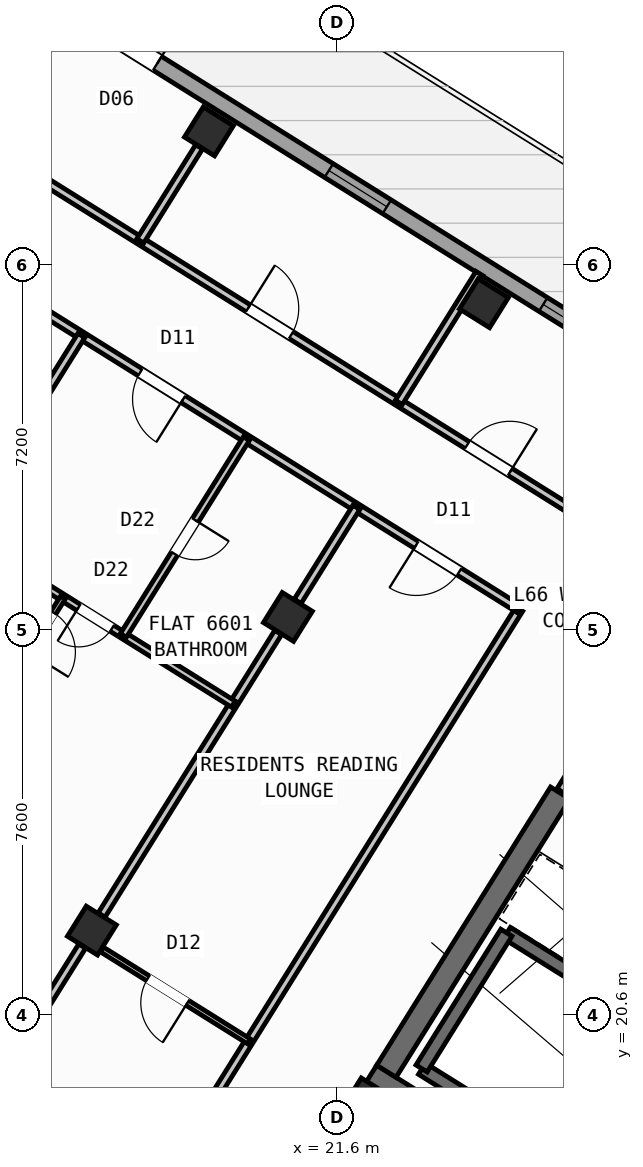
"""IFC4 building model, lengths in metres.
Left out: names, types, materials, properties, quantities, classifications, styles, units other than length and angle.
Written with IfcOpenShell. Run it as: python <this file> out.ifc"""

import sys

from ifc_helpers import new_model, si_unit, direction, frame, frame_2d, origin, origin_2d, place, context, subcontext, project, spatial, rectangle, hollow_rectangle, extrude, source, transform, mapped, element, fill, save


model = new_model("IFC4")
c1 = context("Model", 3, precision=1e-05, world=origin(), true_north=direction((0.0, 1.0)))
c2 = subcontext(c1, "Body", "Model", "MODEL_VIEW")
j1 = project(units=[si_unit("LENGTHUNIT", "METRE"), si_unit("PLANEANGLEUNIT", "RADIAN")], contexts=[c1])
p1 = place(None, origin())
s1 = spatial("IfcSite", under=j1, at=p1, CompositionType="ELEMENT")
p2 = place(p1, origin())
s2 = spatial("IfcBuilding", under=s1, at=p2, CompositionType="ELEMENT")
p3 = place(p2, frame((0.0, 0.0, 262.8)))
s3 = spatial("IfcBuildingStorey", under=s2, at=p3, CompositionType="ELEMENT", Elevation=262.8)
p4 = place(p3, frame((33.324, 12.503, 0.0), z_axis=(0.0, 0.0, 1.0), x_axis=(-0.848043529849, 0.529926571782, 0.0)))
e1 = element("IfcWall", 1, at=p4, inside=s3, PredefinedType="SHEAR", context=c2, shape_type="SweptSolid", body=[
    extrude(rectangle(XDim=13.04, YDim=0.45, at=frame_2d((6.52, 0.0))), origin(), (0.0, 0.0, 1.0), 3.35),
])
p5 = place(p3, frame((26.007, 24.976, 0.0), z_axis=(0.0, 0.0, 1.0), x_axis=(-0.529931155655, -0.848040665456, 0.0)))
e2 = element("IfcWall", 2, at=p5, inside=s3, PredefinedType="SHEAR", context=c2, shape_type="SweptSolid", body=[
    extrude(rectangle(XDim=6.475, YDim=0.45, at=frame_2d((3.238, 0.0))), origin(), (0.0, 0.0, 1.0), 3.35),
])
m1 = source(origin(), c2, "Body", "SweptSolid", [
    extrude(hollow_rectangle(XDim=0.7, YDim=0.7, WallThickness=0.028, at=origin_2d()), origin(), (0.0, 0.0, 1.0), 3.6),
])
for number, where, z_axis, x_axis in (
    (3, (22.191, 18.87, 0.0), (0.0, 0.0, 1.0), (-0.848, 0.53, 0.0)),
    (4, (24.5, 34.643, 0.0), (0.0, 0.0, 1.0), (-0.848, 0.53, 0.0)),
    (5, (20.632, 28.452, 0.0), (0.0, 0.0, 1.0), (-0.848, 0.53, 0.0)),
    (6, (16.764, 22.261, 0.0), (0.0, 0.0, 1.0), (-0.848, 0.53, 0.0)),
    (7, (19.073, 38.034, 0.0), (0.0, 0.0, 1.0), (-0.848, 0.53, 0.0)),
):
    element("IfcColumn", number, at=place(p3, frame(where, z_axis=z_axis, x_axis=x_axis)), inside=s3, PredefinedType="COLUMN", context=c2, shape_type="MappedRepresentation", body=[
        mapped(m1, transform((0.0, 0.0, 0.0), scale=1.0)),
    ])
p6 = place(p3, frame((29.268, 6.429, 0.0), z_axis=(0.0, 0.0, 1.0), x_axis=(-0.848049971435, 0.529916263149, 0.0)))
e8 = element("IfcWall", 8, at=p6, inside=s3, PredefinedType="STANDARD", context=c2, shape_type="SweptSolid", body=[
    extrude(rectangle(XDim=31.588, YDim=0.32, at=frame_2d((15.794, 0.0))), origin(), (0.0, 0.0, 1.0), 3.35),
])
p7 = place(p6, frame((16.362, 0.0, 0.0)))
e9 = element("IfcOpeningElement", 9, at=p7, cuts=e8, PredefinedType="OPENING", context=c2, shape_type="SweptSolid", body=[
    extrude(rectangle(XDim=1.2, YDim=2.15, at=frame_2d((0.6, 1.075))), frame((0.0, 0.17, 0.0), z_axis=(0.0, -1.0, 0.0), x_axis=(1.0, 0.0, 0.0)), (0.0, 0.0, 1.0), 0.34),
])
p8 = place(p6, frame((3.859, 0.0, 0.9)))
e10 = element("IfcOpeningElement", 10, at=p8, cuts=e8, PredefinedType="OPENING", context=c2, shape_type="SweptSolid", body=[
    extrude(rectangle(XDim=1.65, YDim=1.45, at=frame_2d((0.825, 0.725))), frame((0.0, 0.17, 0.0), z_axis=(0.0, -1.0, 0.0), x_axis=(1.0, 0.0, 0.0)), (0.0, 0.0, 1.0), 0.34),
])
p9 = place(p6, frame((10.519, 0.0, 0.9)))
e11 = element("IfcOpeningElement", 11, at=p9, cuts=e8, PredefinedType="OPENING", context=c2, shape_type="SweptSolid", body=[
    extrude(rectangle(XDim=1.65, YDim=1.45, at=frame_2d((0.825, 0.725))), frame((0.0, 0.17, 0.0), z_axis=(0.0, -1.0, 0.0), x_axis=(1.0, 0.0, 0.0)), (0.0, 0.0, 1.0), 0.34),
])
p10 = place(p6, frame((20.015, 0.0, 0.95)))
e12 = element("IfcOpeningElement", 12, at=p10, cuts=e8, PredefinedType="OPENING", context=c2, shape_type="SweptSolid", body=[
    extrude(rectangle(XDim=1.95, YDim=1.35, at=frame_2d((0.975, 0.675))), frame((0.0, 0.17, 0.0), z_axis=(0.0, -1.0, 0.0), x_axis=(1.0, 0.0, 0.0)), (0.0, 0.0, 1.0), 0.34),
])
p11 = place(p6, frame((23.715, 0.0, 1.0)))
e13 = element("IfcOpeningElement", 13, at=p11, cuts=e8, PredefinedType="OPENING", context=c2, shape_type="SweptSolid", body=[
    extrude(rectangle(XDim=0.9, YDim=1.25, at=frame_2d((0.45, 0.625))), frame((0.0, 0.17, 0.0), z_axis=(0.0, -1.0, 0.0), x_axis=(1.0, 0.0, 0.0)), (0.0, 0.0, 1.0), 0.34),
])
p12 = place(p6, frame((26.391, 0.0, 0.9)))
e14 = element("IfcOpeningElement", 14, at=p12, cuts=e8, PredefinedType="OPENING", context=c2, shape_type="SweptSolid", body=[
    extrude(rectangle(XDim=1.65, YDim=1.45, at=frame_2d((0.825, 0.725))), frame((0.0, 0.17, 0.0), z_axis=(0.0, -1.0, 0.0), x_axis=(1.0, 0.0, 0.0)), (0.0, 0.0, 1.0), 0.34),
])
p13 = place(p6, frame((29.878, 0.0, 1.0)))
e15 = element("IfcOpeningElement", 15, at=p13, cuts=e8, PredefinedType="OPENING", context=c2, shape_type="SweptSolid", body=[
    extrude(rectangle(XDim=0.9, YDim=1.25, at=frame_2d((0.45, 0.625))), frame((0.0, 0.17, 0.0), z_axis=(0.0, -1.0, 0.0), x_axis=(1.0, 0.0, 0.0)), (0.0, 0.0, 1.0), 0.34),
])
p14 = place(p3, frame((14.138, 41.825, 0.0), z_axis=(0.0, 0.0, 1.0), x_axis=(0.848046498049, -0.529921821731, 0.0)))
e16 = element("IfcWall", 16, at=p14, inside=s3, PredefinedType="STANDARD", context=c2, shape_type="SweptSolid", body=[
    extrude(rectangle(XDim=31.588, YDim=0.32, at=frame_2d((15.794, 0.0))), origin(), (0.0, 0.0, 1.0), 3.35),
])
p15 = place(p14, frame((3.568, 0.0, 0.0)))
e17 = element("IfcOpeningElement", 17, at=p15, cuts=e16, PredefinedType="OPENING", context=c2, shape_type="SweptSolid", body=[
    extrude(rectangle(XDim=1.05, YDim=2.15, at=frame_2d((0.525, 1.075))), frame((0.0, 0.17, 0.0), z_axis=(0.0, -1.0, 0.0), x_axis=(1.0, 0.0, 0.0)), (0.0, 0.0, 1.0), 0.34),
])
p16 = place(p14, frame((1.046, 0.0, 0.9)))
e18 = element("IfcOpeningElement", 18, at=p16, cuts=e16, PredefinedType="OPENING", context=c2, shape_type="SweptSolid", body=[
    extrude(rectangle(XDim=1.65, YDim=1.45, at=frame_2d((0.825, 0.725))), frame((0.0, 0.17, 0.0), z_axis=(0.0, -1.0, 0.0), x_axis=(1.0, 0.0, 0.0)), (0.0, 0.0, 1.0), 0.34),
])
p17 = place(p14, frame((8.61, 0.0, 0.9)))
e19 = element("IfcOpeningElement", 19, at=p17, cuts=e16, PredefinedType="OPENING", context=c2, shape_type="SweptSolid", body=[
    extrude(rectangle(XDim=1.35, YDim=1.45, at=frame_2d((0.675, 0.725))), frame((0.0, 0.17, 0.0), z_axis=(0.0, -1.0, 0.0), x_axis=(1.0, 0.0, 0.0)), (0.0, 0.0, 1.0), 0.34),
])
p18 = place(p14, frame((13.599, 0.0, 0.95)))
e20 = element("IfcOpeningElement", 20, at=p18, cuts=e16, PredefinedType="OPENING", context=c2, shape_type="SweptSolid", body=[
    extrude(rectangle(XDim=1.95, YDim=1.35, at=frame_2d((0.975, 0.675))), frame((0.0, 0.17, 0.0), z_axis=(0.0, -1.0, 0.0), x_axis=(1.0, 0.0, 0.0)), (0.0, 0.0, 1.0), 0.34),
])
p19 = place(p14, frame((17.154, 0.0, 1.0)))
e21 = element("IfcOpeningElement", 21, at=p19, cuts=e16, PredefinedType="OPENING", context=c2, shape_type="SweptSolid", body=[
    extrude(rectangle(XDim=0.9, YDim=1.25, at=frame_2d((0.45, 0.625))), frame((0.0, 0.17, 0.0), z_axis=(0.0, -1.0, 0.0), x_axis=(1.0, 0.0, 0.0)), (0.0, 0.0, 1.0), 0.34),
])
p20 = place(p14, frame((21.719, 0.0, 0.9)))
e22 = element("IfcOpeningElement", 22, at=p20, cuts=e16, PredefinedType="OPENING", context=c2, shape_type="SweptSolid", body=[
    extrude(rectangle(XDim=1.65, YDim=1.45, at=frame_2d((0.825, 0.725))), frame((0.0, 0.17, 0.0), z_axis=(0.0, -1.0, 0.0), x_axis=(1.0, 0.0, 0.0)), (0.0, 0.0, 1.0), 0.34),
])
p21 = place(p14, frame((27.419, 0.0, 0.9)))
e23 = element("IfcOpeningElement", 23, at=p21, cuts=e16, PredefinedType="OPENING", context=c2, shape_type="SweptSolid", body=[
    extrude(rectangle(XDim=1.65, YDim=1.45, at=frame_2d((0.825, 0.725))), frame((0.0, 0.17, 0.0), z_axis=(0.0, -1.0, 0.0), x_axis=(1.0, 0.0, 0.0)), (0.0, 0.0, 1.0), 0.34),
])
p22 = place(p3, frame((29.605, 15.581, 0.0), z_axis=(0.0, 0.0, 1.0), x_axis=(-0.848036911448, 0.529937163087, 0.0)))
e24 = element("IfcWall", 24, at=p22, inside=s3, PredefinedType="SHEAR", context=c2, shape_type="SweptSolid", body=[
    extrude(rectangle(XDim=7.46, YDim=0.26, at=frame_2d((3.73, 0.0))), origin(), (0.0, 0.0, 1.0), 3.35),
])
p23 = place(p3, frame((31.28, 18.261, 0.0), z_axis=(0.0, 0.0, 1.0), x_axis=(-0.848051618787, 0.529913626805, 0.0)))
e25 = element("IfcWall", 25, at=p23, inside=s3, PredefinedType="SHEAR", context=c2, shape_type="SweptSolid", body=[
    extrude(rectangle(XDim=7.46, YDim=0.26, at=frame_2d((3.73, 0.0))), origin(), (0.0, 0.0, 1.0), 3.35),
])
p24 = place(p23, frame((0.36, 0.0, 0.0)))
e26 = element("IfcOpeningElement", 26, at=p24, cuts=e25, PredefinedType="OPENING", context=c2, shape_type="SweptSolid", body=[
    extrude(rectangle(XDim=0.86, YDim=2.05, at=frame_2d((0.43, 1.025))), frame((0.0, 0.14, 0.0), z_axis=(0.0, -1.0, 0.0), x_axis=(1.0, 0.0, 0.0)), (0.0, 0.0, 1.0), 0.28),
])
p25 = place(p3, frame((24.945, 22.22, 0.0), z_axis=(0.0, 0.0, 1.0), x_axis=(-0.529908658664, -0.84805472316, 0.0)))
e27 = element("IfcWall", 27, at=p25, inside=s3, PredefinedType="SHEAR", context=c2, shape_type="SweptSolid", body=[
    extrude(rectangle(XDim=3.16, YDim=0.26, at=frame_2d((1.58, 0.0))), origin(), (0.0, 0.0, 1.0), 3.35),
])
p26 = place(p3, frame((27.596, 27.52, 0.0), z_axis=(0.0, 0.0, 1.0), x_axis=(-0.529865479138, -0.848081702443, 0.0)))
e28 = element("IfcWall", 28, at=p26, inside=s3, PredefinedType="STANDARD", context=c2, shape_type="SweptSolid", body=[
    extrude(rectangle(XDim=2.96, YDim=0.2, at=frame_2d((1.48, 0.0))), origin(), (0.0, 0.0, 1.0), 3.34),
])
p27 = place(p26, frame((0.7, 0.0, 0.0)))
e29 = element("IfcOpeningElement", 29, at=p27, cuts=e28, PredefinedType="OPENING", context=c2, shape_type="SweptSolid", body=[
    extrude(rectangle(XDim=1.5, YDim=2.15, at=frame_2d((0.75, 1.075))), frame((0.0, 0.11, 0.0), z_axis=(0.0, -1.0, 0.0), x_axis=(1.0, 0.0, 0.0)), (0.0, 0.0, 1.0), 0.22),
])
p28 = place(p3, frame((25.198, 28.606, 0.0), z_axis=(0.0, 0.0, 1.0), x_axis=(-0.529921796515, -0.848046513806, 0.0)))
e30 = element("IfcWall", 30, at=p28, inside=s3, PredefinedType="PARTITIONING", context=c2, shape_type="SweptSolid", body=[
    extrude(rectangle(XDim=16.5, YDim=0.16, at=frame_2d((8.25, 0.0))), origin(), (0.0, 0.0, 1.0), 3.34),
])
p29 = place(p3, frame((26.363, 30.472, 0.0), z_axis=(0.0, 0.0, 1.0), x_axis=(-0.848052408131, 0.529912363569, 0.0)))
e31 = element("IfcWall", 31, at=p29, inside=s3, PredefinedType="PARTITIONING", context=c2, shape_type="SweptSolid", body=[
    extrude(rectangle(XDim=16.73, YDim=0.16, at=frame_2d((8.365, 0.0))), origin(), (0.0, 0.0, 1.0), 3.34),
])
p30 = place(p29, frame((1.588, 0.0, 0.0)))
e32 = element("IfcOpeningElement", 32, at=p30, cuts=e31, PredefinedType="OPENING", context=c2, shape_type="SweptSolid", body=[
    extrude(rectangle(XDim=1.0, YDim=2.1, at=frame_2d((0.5, 1.05))), frame((0.0, 0.09, 0.0), z_axis=(0.0, -1.0, 0.0), x_axis=(1.0, 0.0, 0.0)), (0.0, 0.0, 1.0), 0.18),
])
p31 = place(p29, frame((6.685, 0.0, 0.0)))
e33 = element("IfcOpeningElement", 33, at=p31, cuts=e31, PredefinedType="OPENING", context=c2, shape_type="SweptSolid", body=[
    extrude(rectangle(XDim=1.0, YDim=2.1, at=frame_2d((0.5, 1.05))), frame((0.0, 0.09, 0.0), z_axis=(0.0, -1.0, 0.0), x_axis=(1.0, 0.0, 0.0)), (0.0, 0.0, 1.0), 0.18),
])
p32 = place(p29, frame((12.951, 0.0, 0.0)))
e34 = element("IfcOpeningElement", 34, at=p32, cuts=e31, PredefinedType="OPENING", context=c2, shape_type="SweptSolid", body=[
    extrude(rectangle(XDim=1.0, YDim=2.1, at=frame_2d((0.5, 1.05))), frame((0.0, 0.09, 0.0), z_axis=(0.0, -1.0, 0.0), x_axis=(1.0, 0.0, 0.0)), (0.0, 0.0, 1.0), 0.18),
])
p33 = place(p3, frame((25.198, 28.606, 0.0), z_axis=(0.0, 0.0, 1.0), x_axis=(-0.848052408131, 0.529912363569, 0.0)))
e35 = element("IfcWall", 35, at=p33, inside=s3, PredefinedType="PARTITIONING", context=c2, shape_type="SweptSolid", body=[
    extrude(rectangle(XDim=16.73, YDim=0.16, at=frame_2d((8.365, 0.0))), origin(), (0.0, 0.0, 1.0), 3.34),
])
p34 = place(p33, frame((1.395, 0.0, 0.0)))
e36 = element("IfcOpeningElement", 36, at=p34, cuts=e35, PredefinedType="OPENING", context=c2, shape_type="SweptSolid", body=[
    extrude(rectangle(XDim=1.0, YDim=2.1, at=frame_2d((0.5, 1.05))), frame((0.0, 0.09, 0.0), z_axis=(0.0, -1.0, 0.0), x_axis=(1.0, 0.0, 0.0)), (0.0, 0.0, 1.0), 0.18),
])
p35 = place(p33, frame((7.82, 0.0, 0.0)))
e37 = element("IfcOpeningElement", 37, at=p35, cuts=e35, PredefinedType="OPENING", context=c2, shape_type="SweptSolid", body=[
    extrude(rectangle(XDim=1.0, YDim=2.1, at=frame_2d((0.5, 1.05))), frame((0.0, 0.09, 0.0), z_axis=(0.0, -1.0, 0.0), x_axis=(1.0, 0.0, 0.0)), (0.0, 0.0, 1.0), 0.18),
])
p36 = place(p33, frame((14.76, 0.0, 0.0)))
e38 = element("IfcOpeningElement", 38, at=p36, cuts=e35, PredefinedType="OPENING", context=c2, shape_type="SweptSolid", body=[
    extrude(rectangle(XDim=1.0, YDim=2.1, at=frame_2d((0.5, 1.05))), frame((0.0, 0.09, 0.0), z_axis=(0.0, -1.0, 0.0), x_axis=(1.0, 0.0, 0.0)), (0.0, 0.0, 1.0), 0.18),
])
p37 = place(p3, frame((21.983, 30.615, 0.0), z_axis=(0.0, 0.0, 1.0), x_axis=(-0.5299186965, -0.848048450915, 0.0)))
e39 = element("IfcWall", 39, at=p37, inside=s3, PredefinedType="PARTITIONING", context=c2, shape_type="SweptSolid", body=[
    extrude(rectangle(XDim=2.188, YDim=0.16, at=frame_2d((1.094, 0.0))), origin(), (0.0, 0.0, 1.0), 2.875),
])
p38 = place(p3, frame((20.44, 28.145, 0.0), z_axis=(0.0, 0.0, 1.0), x_axis=(-0.529938869374, -0.84803584519, 0.0)))
e40 = element("IfcWall", 40, at=p38, inside=s3, PredefinedType="PARTITIONING", context=c2, shape_type="SweptSolid", body=[
    extrude(rectangle(XDim=6.576, YDim=0.16, at=frame_2d((3.288, 0.0))), origin(), (0.0, 0.0, 1.0), 2.875),
])
p39 = place(p3, frame((16.572, 21.954, 0.0), z_axis=(0.0, 0.0, 1.0), x_axis=(-0.529904903214, -0.848057069748, 0.0)))
e41 = element("IfcWall", 41, at=p39, inside=s3, PredefinedType="PARTITIONING", context=c2, shape_type="SweptSolid", body=[
    extrude(rectangle(XDim=5.601, YDim=0.16, at=frame_2d((2.801, 0.0))), origin(), (0.0, 0.0, 1.0), 2.875),
])
p40 = place(p3, frame((19.865, 20.073, 0.0), z_axis=(0.0, 0.0, 1.0), x_axis=(-0.84807831592, 0.529870899433, 0.0)))
e42 = element("IfcWall", 42, at=p40, inside=s3, PredefinedType="PARTITIONING", context=c2, shape_type="SweptSolid", body=[
    extrude(rectangle(XDim=3.428, YDim=0.11, at=frame_2d((1.714, 0.0))), origin(), (0.0, 0.0, 1.0), 2.875),
])
p41 = place(p40, frame((1.435, 0.0, 0.0)))
e43 = element("IfcOpeningElement", 43, at=p41, cuts=e42, PredefinedType="OPENING", context=c2, shape_type="SweptSolid", body=[
    extrude(rectangle(XDim=0.92, YDim=2.08, at=frame_2d((0.46, 1.04))), frame((0.0, 0.065, 0.0), z_axis=(0.0, -1.0, 0.0), x_axis=(1.0, 0.0, 0.0)), (0.0, 0.0, 1.0), 0.13),
])
p42 = place(p3, frame((16.556, 34.006, 0.0), z_axis=(0.0, 0.0, 1.0), x_axis=(-0.529998940003, -0.847998304005, 0.0)))
e44 = element("IfcWall", 44, at=p42, inside=s3, PredefinedType="PARTITIONING", context=c2, shape_type="SweptSolid", body=[
    extrude(rectangle(XDim=2.188, YDim=0.16, at=frame_2d((1.094, 0.0))), origin(), (0.0, 0.0, 1.0), 2.875),
])
p43 = place(p3, frame((19.556, 26.73, 0.0), z_axis=(0.0, 0.0, 1.0), x_axis=(-0.848049732085, 0.529916646191, 0.0)))
e45 = element("IfcWall", 45, at=p43, inside=s3, PredefinedType="PLUMBINGWALL", context=c2, shape_type="SweptSolid", body=[
    extrude(rectangle(XDim=6.4, YDim=0.14, at=frame_2d((3.2, 0.0))), origin(), (0.0, 0.0, 1.0), 3.34),
])
p44 = place(p43, frame((2.824, 0.0, 0.0)))
e46 = element("IfcOpeningElement", 46, at=p44, cuts=e45, PredefinedType="OPENING", context=c2, shape_type="SweptSolid", body=[
    extrude(rectangle(XDim=0.78, YDim=2.05, at=frame_2d((0.39, 1.025))), frame((0.0, 0.08, 0.0), z_axis=(0.0, -1.0, 0.0), x_axis=(1.0, 0.0, 0.0)), (0.0, 0.0, 1.0), 0.16),
])
p45 = place(p3, frame((19.812, 31.971, 0.0), z_axis=(0.0, 0.0, 1.0), x_axis=(-0.529917480809, -0.848049210561, 0.0)))
e47 = element("IfcWall", 47, at=p45, inside=s3, PredefinedType="PLUMBINGWALL", context=c2, shape_type="SweptSolid", body=[
    extrude(rectangle(XDim=4.58, YDim=0.14, at=frame_2d((2.29, 0.0))), origin(), (0.0, 0.0, 1.0), 3.34),
])
p46 = place(p45, frame((1.9, 0.0, 0.0)))
e48 = element("IfcOpeningElement", 48, at=p46, cuts=e47, PredefinedType="OPENING", context=c2, shape_type="SweptSolid", body=[
    extrude(rectangle(XDim=0.78, YDim=2.05, at=frame_2d((0.39, 1.025))), frame((0.0, 0.08, 0.0), z_axis=(0.0, -1.0, 0.0), x_axis=(1.0, 0.0, 0.0)), (0.0, 0.0, 1.0), 0.16),
])
p47 = place(p3, frame((16.191, 28.833, 0.0), z_axis=(0.0, 0.0, 1.0), x_axis=(-0.529921526101, -0.84804668278, 0.0)))
e49 = element("IfcWall", 49, at=p47, inside=s3, PredefinedType="PARTITIONING", context=c2, shape_type="SweptSolid", body=[
    extrude(rectangle(XDim=12.19, YDim=0.11, at=frame_2d((6.095, 0.0))), origin(), (0.0, 0.0, 1.0), 3.34),
])
p48 = place(p47, frame((0.35, 0.0, 0.0)))
e50 = element("IfcOpeningElement", 50, at=p48, cuts=e49, PredefinedType="OPENING", context=c2, shape_type="SweptSolid", body=[
    extrude(rectangle(XDim=0.92, YDim=2.08, at=frame_2d((0.46, 1.04))), frame((0.0, 0.065, 0.0), z_axis=(0.0, -1.0, 0.0), x_axis=(1.0, 0.0, 0.0)), (0.0, 0.0, 1.0), 0.13),
])
p49 = place(p3, frame((24.411, 35.229, 0.0), z_axis=(0.0, 0.0, 1.0), x_axis=(-0.529874576144, -0.848076018737, 0.0)))
e51 = element("IfcWall", 51, at=p49, inside=s3, PredefinedType="PARTITIONING", context=c2, shape_type="SweptSolid", body=[
    extrude(rectangle(XDim=3.0, YDim=0.16, at=frame_2d((1.5, 0.0))), origin(), (0.0, 0.0, 1.0), 3.34),
])
p50 = place(p3, frame((18.879, 37.729, 0.0), z_axis=(0.0, 0.0, 1.0), x_axis=(-0.52994879608, -0.848029641896, 0.0)))
e52 = element("IfcWall", 52, at=p50, inside=s3, PredefinedType="PARTITIONING", context=c2, shape_type="SweptSolid", body=[
    extrude(rectangle(XDim=2.188, YDim=0.16, at=frame_2d((1.094, 0.0))), origin(), (0.0, 0.0, 1.0), 2.875),
])
m2 = source(origin(), c2, "Body", "SweptSolid", [
    extrude(rectangle(XDim=1.05, YDim=2.15, at=frame_2d((0.525, 1.075))), frame((0.0, 0.025, 0.0), z_axis=(0.0, -1.0, 0.0), x_axis=(1.0, 0.0, 0.0)), (0.0, 0.0, 1.0), 0.05),
])
p51 = place(p15, origin())
e53 = element("IfcDoor", 53, at=p51, inside=s3, OperationType="SINGLE_SWING_RIGHT", PredefinedType="DOOR", context=c2, shape_type="MappedRepresentation", body=[
    mapped(m2, transform((0.0, 0.0, 0.0), scale=1.0)),
])
fill(e17, e53)
m3 = source(origin(), c2, "Body", "SweptSolid", [
    extrude(rectangle(XDim=1.35, YDim=1.45, at=frame_2d((0.675, 0.725))), frame((0.0, 0.03, 0.0), z_axis=(0.0, -1.0, 0.0), x_axis=(1.0, 0.0, 0.0)), (0.0, 0.0, 1.0), 0.06),
])
p52 = place(p17, origin())
e54 = element("IfcWindow", 54, at=p52, inside=s3, PartitioningType="SINGLE_PANEL", PredefinedType="WINDOW", context=c2, shape_type="MappedRepresentation", body=[
    mapped(m3, transform((0.0, 0.0, 0.0), scale=1.0)),
])
fill(e19, e54)
m4 = source(origin(), c2, "Body", "SweptSolid", [
    extrude(rectangle(XDim=1.95, YDim=1.35, at=frame_2d((0.975, 0.675))), frame((0.0, 0.03, 0.0), z_axis=(0.0, -1.0, 0.0), x_axis=(1.0, 0.0, 0.0)), (0.0, 0.0, 1.0), 0.06),
])
p53 = place(p18, origin())
e55 = element("IfcWindow", 55, at=p53, inside=s3, PartitioningType="SINGLE_PANEL", PredefinedType="WINDOW", context=c2, shape_type="MappedRepresentation", body=[
    mapped(m4, transform((0.0, 0.0, 0.0), scale=1.0)),
])
fill(e20, e55)
m5 = source(origin(), c2, "Body", "SweptSolid", [
    extrude(rectangle(XDim=1.0, YDim=2.1, at=frame_2d((0.5, 1.05))), frame((0.0, 0.025, 0.0), z_axis=(0.0, -1.0, 0.0), x_axis=(1.0, 0.0, 0.0)), (0.0, 0.0, 1.0), 0.05),
])
p54 = place(p34, origin())
e56 = element("IfcDoor", 56, at=p54, inside=s3, OperationType="SINGLE_SWING_RIGHT", PredefinedType="DOOR", context=c2, shape_type="MappedRepresentation", body=[
    mapped(m5, transform((0.0, 0.0, 0.0), scale=1.0)),
])
fill(e36, e56)
m6 = source(origin(), c2, "Body", "SweptSolid", [
    extrude(rectangle(XDim=0.92, YDim=2.08, at=frame_2d((0.46, 1.04))), frame((0.0, 0.025, 0.0), z_axis=(0.0, -1.0, 0.0), x_axis=(1.0, 0.0, 0.0)), (0.0, 0.0, 1.0), 0.05),
])
p55 = place(p41, origin())
e57 = element("IfcDoor", 57, at=p55, inside=s3, OperationType="SINGLE_SWING_LEFT", PredefinedType="DOOR", context=c2, shape_type="MappedRepresentation", body=[
    mapped(m6, transform((0.0, 0.0, 0.0), scale=1.0)),
])
fill(e43, e57)
p56 = place(p48, origin())
e58 = element("IfcDoor", 58, at=p56, inside=s3, OperationType="SINGLE_SWING_RIGHT", PredefinedType="DOOR", context=c2, shape_type="MappedRepresentation", body=[
    mapped(m6, transform((0.0, 0.0, 0.0), scale=1.0)),
])
fill(e50, e58)
p57 = place(p35, origin())
e59 = element("IfcDoor", 59, at=p57, inside=s3, OperationType="SINGLE_SWING_LEFT", PredefinedType="DOOR", context=c2, shape_type="MappedRepresentation", body=[
    mapped(m5, transform((0.0, 0.0, 0.0), scale=1.0)),
])
fill(e37, e59)
m7 = source(origin(), c2, "Body", "SweptSolid", [
    extrude(rectangle(XDim=0.78, YDim=2.05, at=frame_2d((0.39, 1.025))), frame((0.0, 0.025, 0.0), z_axis=(0.0, -1.0, 0.0), x_axis=(1.0, 0.0, 0.0)), (0.0, 0.0, 1.0), 0.05),
])
p58 = place(p44, origin())
e60 = element("IfcDoor", 60, at=p58, inside=s3, OperationType="SINGLE_SWING_RIGHT", PredefinedType="DOOR", context=c2, shape_type="MappedRepresentation", body=[
    mapped(m7, transform((0.0, 0.0, 0.0), scale=1.0)),
])
fill(e46, e60)
p59 = place(p46, origin())
e61 = element("IfcDoor", 61, at=p59, inside=s3, OperationType="SINGLE_SWING_LEFT", PredefinedType="DOOR", context=c2, shape_type="MappedRepresentation", body=[
    mapped(m7, transform((0.0, 0.0, 0.0), scale=1.0)),
])
fill(e48, e61)
p60 = place(p30, frame((1.0, 0.0, 0.0), z_axis=(0.0, 0.0, 1.0), x_axis=(-1.0, 0.0, 0.0)))
e62 = element("IfcDoor", 62, at=p60, inside=s3, OperationType="SINGLE_SWING_RIGHT", PredefinedType="DOOR", context=c2, shape_type="MappedRepresentation", body=[
    mapped(m5, transform((0.0, 0.0, 0.0), scale=1.0)),
])
fill(e32, e62)
p61 = place(p31, frame((1.0, 0.0, 0.0), z_axis=(0.0, 0.0, 1.0), x_axis=(-1.0, 0.0, 0.0)))
e63 = element("IfcDoor", 63, at=p61, inside=s3, OperationType="SINGLE_SWING_LEFT", PredefinedType="DOOR", context=c2, shape_type="MappedRepresentation", body=[
    mapped(m5, transform((0.0, 0.0, 0.0), scale=1.0)),
])
fill(e33, e63)
save(model, sys.argv[1])
